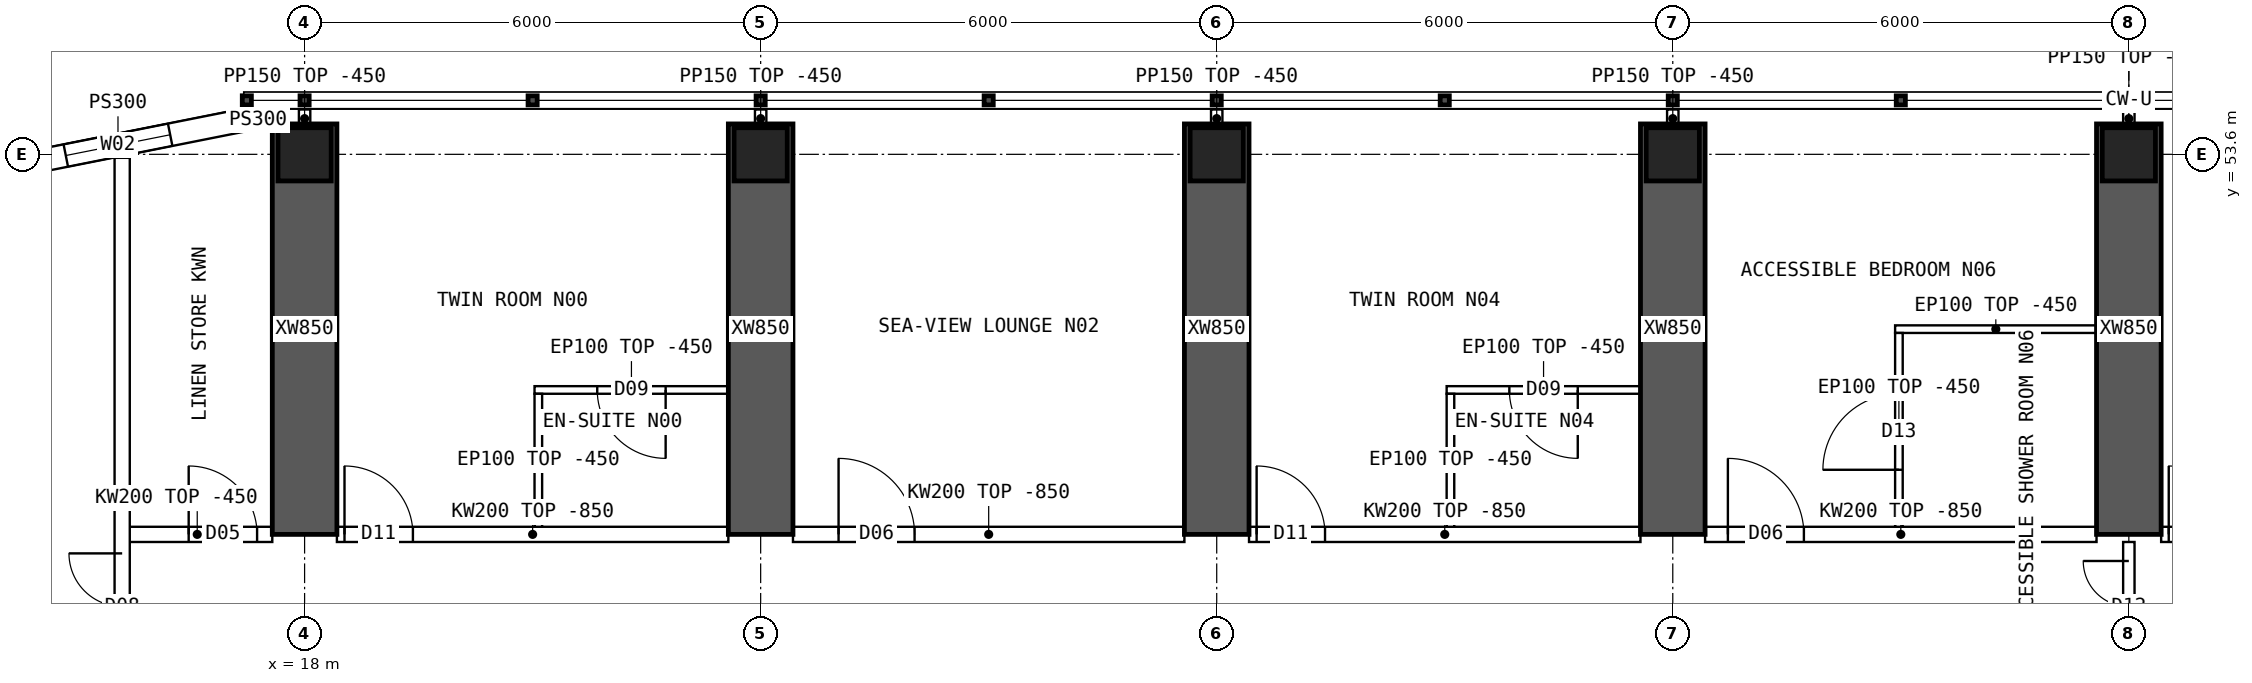
"""IFC4 building model, lengths in metres.
Left out: names, types, materials, properties, quantities, classifications, styles, units other than length and angle.
Written with IfcOpenShell. Run it as: python <this file> out.ifc"""

import sys

from ifc_helpers import new_model, si_unit, direction, frame, frame_2d, origin, origin_2d, place, context, subcontext, project, spatial, polyline, rectangle, hollow_rectangle, outline, extrude, element, fill, save


model = new_model("IFC4")
c1 = context("Model", 3, precision=1e-05, world=origin(), true_north=direction((0.0, 1.0)))
c2 = subcontext(c1, "Body", "Model", "MODEL_VIEW")
j1 = project(units=[si_unit("LENGTHUNIT", "METRE"), si_unit("PLANEANGLEUNIT", "RADIAN")], contexts=[c1])
p1 = place(None, origin())
s1 = spatial("IfcSite", under=j1, at=p1, CompositionType="ELEMENT")
p2 = place(p1, origin())
s2 = spatial("IfcBuilding", under=s1, at=p2, CompositionType="ELEMENT")
p3 = place(p2, frame((0.0, 0.0, 189.85)))
s3 = spatial("IfcBuildingStorey", under=s2, at=p3, CompositionType="ELEMENT", Elevation=189.85)
for number, where, z_axis, x_axis in (
    (1, (18.0, 53.6, 0.0), (0.0, 0.0, 1.0), (1.0, 0.0, 0.0)),
    (2, (24.0, 53.6, 0.0), (0.0, 0.0, 1.0), (1.0, 0.0, 0.0)),
    (3, (30.0, 53.6, 0.0), (0.0, 0.0, 1.0), (1.0, 0.0, 0.0)),
    (4, (36.0, 53.6, 0.0), (0.0, 0.0, 1.0), (1.0, 0.0, 0.0)),
    (5, (42.0, 53.6, 0.0), (0.0, 0.0, 1.0), (1.0, 0.0, 0.0)),
):
    element("IfcColumn", number, at=place(p3, frame(where, z_axis=z_axis, x_axis=x_axis)), inside=s3, PredefinedType="COLUMN", context=c2, shape_type="SweptSolid", body=[
        extrude(hollow_rectangle(XDim=0.7, YDim=0.7, WallThickness=0.07, at=origin_2d()), origin(), (0.0, 0.0, 1.0), 3.75),
    ])
for number, where, z_axis, x_axis in (
    (6, (18.0, 48.6, 0.0), (0.0, 0.0, 1.0), (0.0, 1.0, 0.0)),
    (7, (24.0, 48.6, 0.0), (0.0, 0.0, 1.0), (0.0, 1.0, 0.0)),
    (8, (30.0, 48.6, 0.0), (0.0, 0.0, 1.0), (0.0, 1.0, 0.0)),
    (9, (36.0, 48.6, 0.0), (0.0, 0.0, 1.0), (0.0, 1.0, 0.0)),
    (10, (42.0, 48.6, 0.0), (0.0, 0.0, 1.0), (0.0, 1.0, 0.0)),
):
    element("IfcWall", number, at=place(p3, frame(where, z_axis=z_axis, x_axis=x_axis)), inside=s3, PredefinedType="SHEAR", context=c2, shape_type="SweptSolid", body=[
        extrude(rectangle(XDim=5.4, YDim=0.85, at=frame_2d((2.7, 0.0))), origin(), (0.0, 0.0, 1.0), 3.75),
    ])
p4 = place(p3, frame((17.2, 54.05, 0.0), z_axis=(0.0, 0.0, 1.0), x_axis=(-0.98078325777, -0.195100490205, 0.0)))
e11 = element("IfcWall", 11, at=p4, inside=s3, PredefinedType="SOLIDWALL", context=c2, shape_type="SweptSolid", body=[
    extrude(outline(polyline([(-0.03, -0.15), (3.405, -0.15), (3.345, 0.15), (0.03, 0.15), (-0.03, -0.15)])), origin(), (0.0, 0.0, 1.0), 3.3),
])
p5 = place(p4, frame((0.988, 0.0, 0.9)))
e12 = element("IfcOpeningElement", 12, at=p5, cuts=e11, PredefinedType="OPENING", context=c2, shape_type="SweptSolid", body=[
    extrude(rectangle(XDim=1.4, YDim=1.8, at=frame_2d((0.7, 0.9))), frame((0.0, 0.16, 0.0), z_axis=(0.0, -1.0, 0.0), x_axis=(1.0, 0.0, 0.0)), (0.0, 0.0, 1.0), 0.32),
])
p6 = place(p3, frame((17.2, 54.05, 0.0), z_axis=(0.0, 0.0, 1.0), x_axis=(1.0, 0.0, 0.0)))
e13 = element("IfcWall", 13, at=p6, inside=s3, PredefinedType="SOLIDWALL", context=c2, shape_type="SweptSolid", body=[
    extrude(rectangle(XDim=0.375, YDim=0.3, at=frame_2d((0.188, 0.0))), origin(), (0.0, 0.0, 1.0), 3.3),
])
p7 = place(p3, frame((15.6, 48.6, 0.0), z_axis=(0.0, 0.0, 1.0), x_axis=(1.0, 0.0, 0.0)))
e14 = element("IfcWall", 14, at=p7, inside=s3, PredefinedType="SOLIDWALL", context=c2, shape_type="SweptSolid", body=[
    extrude(rectangle(XDim=1.975, YDim=0.2, at=frame_2d((0.987, 0.0))), origin(), (0.0, 0.0, 1.0), 3.3),
])
p8 = place(p7, frame((0.875, 0.0, 0.0)))
e15 = element("IfcOpeningElement", 15, at=p8, cuts=e14, PredefinedType="OPENING", context=c2, shape_type="SweptSolid", body=[
    extrude(rectangle(XDim=0.9, YDim=2.1, at=frame_2d((0.45, 1.05))), frame((0.0, 0.11, 0.0), z_axis=(0.0, -1.0, 0.0), x_axis=(1.0, 0.0, 0.0)), (0.0, 0.0, 1.0), 0.22),
])
p9 = place(p3, frame((18.425, 48.6, 0.0), z_axis=(0.0, 0.0, 1.0), x_axis=(1.0, 0.0, 0.0)))
e16 = element("IfcWall", 16, at=p9, inside=s3, PredefinedType="SOLIDWALL", context=c2, shape_type="SweptSolid", body=[
    extrude(outline(polyline([(0.0, 0.0), (5.15, 0.0), (5.15, 2.9), (0.0, 2.9), (0.0, 0.0)])), frame((0.0, 0.1, 0.0), z_axis=(0.0, -1.0, 0.0), x_axis=(1.0, 0.0, 0.0)), (0.0, 0.0, 1.0), 0.2),
])
p10 = place(p9, frame((0.1, 0.0, 0.0)))
e17 = element("IfcOpeningElement", 17, at=p10, cuts=e16, PredefinedType="OPENING", context=c2, shape_type="SweptSolid", body=[
    extrude(rectangle(XDim=0.9, YDim=2.1, at=frame_2d((0.45, 1.05))), frame((0.0, 0.11, 0.0), z_axis=(0.0, -1.0, 0.0), x_axis=(1.0, 0.0, 0.0)), (0.0, 0.0, 1.0), 0.22),
])
p11 = place(p3, frame((24.425, 48.6, 0.0), z_axis=(0.0, 0.0, 1.0), x_axis=(1.0, 0.0, 0.0)))
e18 = element("IfcWall", 18, at=p11, inside=s3, PredefinedType="SOLIDWALL", context=c2, shape_type="SweptSolid", body=[
    extrude(outline(polyline([(0.0, 0.0), (5.15, 0.0), (5.15, 2.9), (0.0, 2.9), (0.0, 0.0)])), frame((0.0, 0.1, 0.0), z_axis=(0.0, -1.0, 0.0), x_axis=(1.0, 0.0, 0.0)), (0.0, 0.0, 1.0), 0.2),
])
p12 = place(p11, frame((0.6, 0.0, 0.0)))
e19 = element("IfcOpeningElement", 19, at=p12, cuts=e18, PredefinedType="OPENING", context=c2, shape_type="SweptSolid", body=[
    extrude(rectangle(XDim=1.0, YDim=2.1, at=frame_2d((0.5, 1.05))), frame((0.0, 0.11, 0.0), z_axis=(0.0, -1.0, 0.0), x_axis=(1.0, 0.0, 0.0)), (0.0, 0.0, 1.0), 0.22),
])
p13 = place(p3, frame((30.425, 48.6, 0.0), z_axis=(0.0, 0.0, 1.0), x_axis=(1.0, 0.0, 0.0)))
e20 = element("IfcWall", 20, at=p13, inside=s3, PredefinedType="SOLIDWALL", context=c2, shape_type="SweptSolid", body=[
    extrude(outline(polyline([(0.0, 0.0), (5.15, 0.0), (5.15, 2.9), (0.0, 2.9), (0.0, 0.0)])), frame((0.0, 0.1, 0.0), z_axis=(0.0, -1.0, 0.0), x_axis=(1.0, 0.0, 0.0)), (0.0, 0.0, 1.0), 0.2),
])
p14 = place(p13, frame((0.1, 0.0, 0.0)))
e21 = element("IfcOpeningElement", 21, at=p14, cuts=e20, PredefinedType="OPENING", context=c2, shape_type="SweptSolid", body=[
    extrude(rectangle(XDim=0.9, YDim=2.1, at=frame_2d((0.45, 1.05))), frame((0.0, 0.11, 0.0), z_axis=(0.0, -1.0, 0.0), x_axis=(1.0, 0.0, 0.0)), (0.0, 0.0, 1.0), 0.22),
])
p15 = place(p3, frame((36.425, 48.6, 0.0), z_axis=(0.0, 0.0, 1.0), x_axis=(1.0, 0.0, 0.0)))
e22 = element("IfcWall", 22, at=p15, inside=s3, PredefinedType="SOLIDWALL", context=c2, shape_type="SweptSolid", body=[
    extrude(outline(polyline([(0.0, 0.0), (5.15, 0.0), (5.15, 2.9), (0.0, 2.9), (0.0, 0.0)])), frame((0.0, 0.1, 0.0), z_axis=(0.0, -1.0, 0.0), x_axis=(1.0, 0.0, 0.0)), (0.0, 0.0, 1.0), 0.2),
])
p16 = place(p15, frame((0.3, 0.0, 0.0)))
e23 = element("IfcOpeningElement", 23, at=p16, cuts=e22, PredefinedType="OPENING", context=c2, shape_type="SweptSolid", body=[
    extrude(rectangle(XDim=1.0, YDim=2.1, at=frame_2d((0.5, 1.05))), frame((0.0, 0.11, 0.0), z_axis=(0.0, -1.0, 0.0), x_axis=(1.0, 0.0, 0.0)), (0.0, 0.0, 1.0), 0.22),
])
p17 = place(p3, frame((42.425, 48.6, 0.0), z_axis=(0.0, 0.0, 1.0), x_axis=(1.0, 0.0, 0.0)))
e24 = element("IfcWall", 24, at=p17, inside=s3, PredefinedType="SOLIDWALL", context=c2, shape_type="SweptSolid", body=[
    extrude(outline(polyline([(0.0, 0.0), (5.15, 0.0), (5.15, 2.9), (0.0, 2.9), (0.0, 0.0)])), frame((0.0, 0.1, 0.0), z_axis=(0.0, -1.0, 0.0), x_axis=(1.0, 0.0, 0.0)), (0.0, 0.0, 1.0), 0.2),
])
p18 = place(p17, frame((0.1, 0.0, 0.0)))
e25 = element("IfcOpeningElement", 25, at=p18, cuts=e24, PredefinedType="OPENING", context=c2, shape_type="SweptSolid", body=[
    extrude(rectangle(XDim=0.9, YDim=2.1, at=frame_2d((0.45, 1.05))), frame((0.0, 0.11, 0.0), z_axis=(0.0, -1.0, 0.0), x_axis=(1.0, 0.0, 0.0)), (0.0, 0.0, 1.0), 0.22),
])
p19 = place(p3, frame((21.025, 50.5, 0.0), z_axis=(0.0, 0.0, 1.0), x_axis=(1.0, 0.0, 0.0)))
e26 = element("IfcWall", 26, at=p19, inside=s3, PredefinedType="PARTITIONING", context=c2, shape_type="SweptSolid", body=[
    extrude(rectangle(XDim=2.55, YDim=0.1, at=frame_2d((1.275, 0.0))), origin(), (0.0, 0.0, 1.0), 3.3),
])
p20 = place(p19, frame((0.825, 0.0, 0.0)))
e27 = element("IfcOpeningElement", 27, at=p20, cuts=e26, PredefinedType="OPENING", context=c2, shape_type="SweptSolid", body=[
    extrude(rectangle(XDim=0.9, YDim=2.1, at=frame_2d((0.45, 1.05))), frame((0.0, 0.06, 0.0), z_axis=(0.0, -1.0, 0.0), x_axis=(1.0, 0.0, 0.0)), (0.0, 0.0, 1.0), 0.12),
])
p21 = place(p3, frame((21.075, 50.45, 0.0), z_axis=(0.0, 0.0, 1.0), x_axis=(0.0, -1.0, 0.0)))
e28 = element("IfcWall", 28, at=p21, inside=s3, PredefinedType="PARTITIONING", context=c2, shape_type="SweptSolid", body=[
    extrude(outline(polyline([(0.0, 0.0), (1.75, 0.0), (1.75, 2.9), (1.702, 2.9), (1.7, 3.3), (0.0, 3.3), (0.0, 0.0)])), frame((0.0, 0.05, 0.0), z_axis=(0.0, -1.0, 0.0), x_axis=(1.0, 0.0, 0.0)), (0.0, 0.0, 1.0), 0.1),
])
p22 = place(p3, frame((33.025, 50.5, 0.0), z_axis=(0.0, 0.0, 1.0), x_axis=(1.0, 0.0, 0.0)))
e29 = element("IfcWall", 29, at=p22, inside=s3, PredefinedType="PARTITIONING", context=c2, shape_type="SweptSolid", body=[
    extrude(rectangle(XDim=2.55, YDim=0.1, at=frame_2d((1.275, 0.0))), origin(), (0.0, 0.0, 1.0), 3.3),
])
p23 = place(p22, frame((0.825, 0.0, 0.0)))
e30 = element("IfcOpeningElement", 30, at=p23, cuts=e29, PredefinedType="OPENING", context=c2, shape_type="SweptSolid", body=[
    extrude(rectangle(XDim=0.9, YDim=2.1, at=frame_2d((0.45, 1.05))), frame((0.0, 0.06, 0.0), z_axis=(0.0, -1.0, 0.0), x_axis=(1.0, 0.0, 0.0)), (0.0, 0.0, 1.0), 0.12),
])
p24 = place(p3, frame((33.075, 50.45, 0.0), z_axis=(0.0, 0.0, 1.0), x_axis=(0.0, -1.0, 0.0)))
e31 = element("IfcWall", 31, at=p24, inside=s3, PredefinedType="PARTITIONING", context=c2, shape_type="SweptSolid", body=[
    extrude(outline(polyline([(0.0, 0.0), (1.75, 0.0), (1.75, 2.9), (1.702, 2.9), (1.7, 3.3), (0.0, 3.3), (0.0, 0.0)])), frame((0.0, 0.05, 0.0), z_axis=(0.0, -1.0, 0.0), x_axis=(1.0, 0.0, 0.0)), (0.0, 0.0, 1.0), 0.1),
])
p25 = place(p3, frame((38.925, 51.3, 0.0), z_axis=(0.0, 0.0, 1.0), x_axis=(1.0, 0.0, 0.0)))
e32 = element("IfcWall", 32, at=p25, inside=s3, PredefinedType="PARTITIONING", context=c2, shape_type="SweptSolid", body=[
    extrude(rectangle(XDim=2.65, YDim=0.1, at=frame_2d((1.325, 0.0))), origin(), (0.0, 0.0, 1.0), 3.3),
])
p26 = place(p3, frame((38.975, 51.25, 0.0), z_axis=(0.0, 0.0, 1.0), x_axis=(0.0, -1.0, 0.0)))
e33 = element("IfcWall", 33, at=p26, inside=s3, PredefinedType="PARTITIONING", context=c2, shape_type="SweptSolid", body=[
    extrude(outline(polyline([(0.0, 0.0), (2.55, 0.0), (2.55, 2.9), (2.502, 2.9), (2.5, 3.3), (0.0, 3.3), (0.0, 0.0)])), frame((0.0, 0.05, 0.0), z_axis=(0.0, -1.0, 0.0), x_axis=(1.0, 0.0, 0.0)), (0.0, 0.0, 1.0), 0.1),
])
p27 = place(p26, frame((0.8, 0.0, 0.0)))
e34 = element("IfcOpeningElement", 34, at=p27, cuts=e33, PredefinedType="OPENING", context=c2, shape_type="SweptSolid", body=[
    extrude(rectangle(XDim=1.0, YDim=2.1, at=frame_2d((0.5, 1.05))), frame((0.0, 0.06, 0.0), z_axis=(0.0, -1.0, 0.0), x_axis=(1.0, 0.0, 0.0)), (0.0, 0.0, 1.0), 0.12),
])
p28 = place(p3, frame((42.0, 46.8, 0.0), z_axis=(0.0, 0.0, 1.0), x_axis=(0.0, 1.0, 0.0)))
e35 = element("IfcWall", 35, at=p28, inside=s3, PredefinedType="PARTITIONING", context=c2, shape_type="SweptSolid", body=[
    extrude(outline(polyline([(0.0, 0.0), (1.7, 0.0), (1.7, 2.9), (0.0, 2.9), (0.0, 0.0)])), frame((0.0, 0.075, 0.0), z_axis=(0.0, -1.0, 0.0), x_axis=(1.0, 0.0, 0.0)), (0.0, 0.0, 1.0), 0.15),
])
p29 = place(p28, frame((0.25, 0.0, 0.0)))
e36 = element("IfcOpeningElement", 36, at=p29, cuts=e35, PredefinedType="OPENING", context=c2, shape_type="SweptSolid", body=[
    extrude(rectangle(XDim=1.2, YDim=2.1, at=frame_2d((0.6, 1.05))), frame((0.0, 0.085, 0.0), z_axis=(0.0, -1.0, 0.0), x_axis=(1.0, 0.0, 0.0)), (0.0, 0.0, 1.0), 0.17),
])
p30 = place(p3, frame((15.6, 10.446, 0.0), z_axis=(0.0, 0.0, 1.0), x_axis=(0.0, 1.0, 0.0)))
e37 = element("IfcWall", 37, at=p30, inside=s3, PredefinedType="SOLIDWALL", context=c2, shape_type="SweptSolid", body=[
    extrude(rectangle(XDim=43.107, YDim=0.2, at=frame_2d((21.554, 0.0))), origin(), (0.0, 0.0, 1.0), 3.3),
])
p31 = place(p30, frame((5.104, 0.0, 0.0)))
e38 = element("IfcOpeningElement", 38, at=p31, cuts=e37, PredefinedType="OPENING", context=c2, shape_type="SweptSolid", body=[
    extrude(rectangle(XDim=1.4, YDim=2.1, at=frame_2d((0.7, 1.05))), frame((0.0, 0.11, 0.0), z_axis=(0.0, -1.0, 0.0), x_axis=(1.0, 0.0, 0.0)), (0.0, 0.0, 1.0), 0.22),
])
p32 = place(p30, frame((36.504, 0.0, 0.0)))
e39 = element("IfcOpeningElement", 39, at=p32, cuts=e37, PredefinedType="OPENING", context=c2, shape_type="SweptSolid", body=[
    extrude(rectangle(XDim=1.4, YDim=2.1, at=frame_2d((0.7, 1.05))), frame((0.0, 0.11, 0.0), z_axis=(0.0, -1.0, 0.0), x_axis=(1.0, 0.0, 0.0)), (0.0, 0.0, 1.0), 0.22),
])
for number, where, z_axis, x_axis in (
    (40, (18.0, 53.95, 0.0), (0.0, 0.0, 1.0), (0.0, 1.0, 0.0)),
    (41, (24.0, 53.95, 0.0), (0.0, 0.0, 1.0), (0.0, 1.0, 0.0)),
    (42, (30.0, 53.95, 0.0), (0.0, 0.0, 1.0), (0.0, 1.0, 0.0)),
    (43, (36.0, 53.95, 0.0), (0.0, 0.0, 1.0), (0.0, 1.0, 0.0)),
    (44, (42.0, 53.95, 0.0), (0.0, 0.0, 1.0), (0.0, 1.0, 0.0)),
):
    element("IfcWall", number, at=place(p3, frame(where, z_axis=z_axis, x_axis=x_axis)), inside=s3, PredefinedType="PARTITIONING", context=c2, shape_type="SweptSolid", body=[
        extrude(rectangle(XDim=0.24, YDim=0.15, at=frame_2d((0.12, 0.0))), origin(), (0.0, 0.0, 1.0), 3.3),
    ])
p33 = place(p5, origin())
e45 = element("IfcWindow", 45, at=p33, inside=s3, PartitioningType="SINGLE_PANEL", PredefinedType="WINDOW", context=c2, shape_type="SweptSolid", body=[
    extrude(rectangle(XDim=1.4, YDim=1.8, at=frame_2d((0.7, 0.9))), frame((0.0, 0.03, 0.0), z_axis=(0.0, -1.0, 0.0), x_axis=(1.0, 0.0, 0.0)), (0.0, 0.0, 1.0), 0.06),
])
fill(e12, e45)
p34 = place(p20, origin())
e46 = element("IfcDoor", 46, at=p34, inside=s3, OperationType="SINGLE_SWING_RIGHT", PredefinedType="DOOR", context=c2, shape_type="SweptSolid", body=[
    extrude(rectangle(XDim=0.9, YDim=2.1, at=frame_2d((0.45, 1.05))), frame((0.0, 0.025, 0.0), z_axis=(0.0, -1.0, 0.0), x_axis=(1.0, 0.0, 0.0)), (0.0, 0.0, 1.0), 0.05),
])
fill(e27, e46)
p35 = place(p10, origin())
e47 = element("IfcDoor", 47, at=p35, inside=s3, OperationType="SINGLE_SWING_LEFT", PredefinedType="DOOR", context=c2, shape_type="SweptSolid", body=[
    extrude(rectangle(XDim=0.9, YDim=2.1, at=frame_2d((0.45, 1.05))), frame((0.0, 0.025, 0.0), z_axis=(0.0, -1.0, 0.0), x_axis=(1.0, 0.0, 0.0)), (0.0, 0.0, 1.0), 0.05),
])
fill(e17, e47)
p36 = place(p12, origin())
e48 = element("IfcDoor", 48, at=p36, inside=s3, OperationType="SINGLE_SWING_LEFT", PredefinedType="DOOR", context=c2, shape_type="SweptSolid", body=[
    extrude(rectangle(XDim=1.0, YDim=2.1, at=frame_2d((0.5, 1.05))), frame((0.0, 0.025, 0.0), z_axis=(0.0, -1.0, 0.0), x_axis=(1.0, 0.0, 0.0)), (0.0, 0.0, 1.0), 0.05),
])
fill(e19, e48)
p37 = place(p23, origin())
e49 = element("IfcDoor", 49, at=p37, inside=s3, OperationType="SINGLE_SWING_RIGHT", PredefinedType="DOOR", context=c2, shape_type="SweptSolid", body=[
    extrude(rectangle(XDim=0.9, YDim=2.1, at=frame_2d((0.45, 1.05))), frame((0.0, 0.025, 0.0), z_axis=(0.0, -1.0, 0.0), x_axis=(1.0, 0.0, 0.0)), (0.0, 0.0, 1.0), 0.05),
])
fill(e30, e49)
p38 = place(p14, origin())
e50 = element("IfcDoor", 50, at=p38, inside=s3, OperationType="SINGLE_SWING_LEFT", PredefinedType="DOOR", context=c2, shape_type="SweptSolid", body=[
    extrude(rectangle(XDim=0.9, YDim=2.1, at=frame_2d((0.45, 1.05))), frame((0.0, 0.025, 0.0), z_axis=(0.0, -1.0, 0.0), x_axis=(1.0, 0.0, 0.0)), (0.0, 0.0, 1.0), 0.05),
])
fill(e21, e50)
p39 = place(p27, origin())
e51 = element("IfcDoor", 51, at=p39, inside=s3, OperationType="SINGLE_SWING_RIGHT", PredefinedType="DOOR", context=c2, shape_type="SweptSolid", body=[
    extrude(rectangle(XDim=1.0, YDim=2.1, at=frame_2d((0.5, 1.05))), frame((0.0, 0.025, 0.0), z_axis=(0.0, -1.0, 0.0), x_axis=(1.0, 0.0, 0.0)), (0.0, 0.0, 1.0), 0.05),
])
fill(e34, e51)
p40 = place(p16, origin())
e52 = element("IfcDoor", 52, at=p40, inside=s3, OperationType="SINGLE_SWING_LEFT", PredefinedType="DOOR", context=c2, shape_type="SweptSolid", body=[
    extrude(rectangle(XDim=1.0, YDim=2.1, at=frame_2d((0.5, 1.05))), frame((0.0, 0.025, 0.0), z_axis=(0.0, -1.0, 0.0), x_axis=(1.0, 0.0, 0.0)), (0.0, 0.0, 1.0), 0.05),
])
fill(e23, e52)
p41 = place(p18, origin())
e53 = element("IfcDoor", 53, at=p41, inside=s3, OperationType="SINGLE_SWING_LEFT", PredefinedType="DOOR", context=c2, shape_type="SweptSolid", body=[
    extrude(rectangle(XDim=0.9, YDim=2.1, at=frame_2d((0.45, 1.05))), frame((0.0, 0.025, 0.0), z_axis=(0.0, -1.0, 0.0), x_axis=(1.0, 0.0, 0.0)), (0.0, 0.0, 1.0), 0.05),
])
fill(e25, e53)
p42 = place(p29, origin())
e54 = element("IfcDoor", 54, at=p42, inside=s3, OperationType="DOUBLE_DOOR_SINGLE_SWING", PredefinedType="DOOR", context=c2, shape_type="SweptSolid", body=[
    extrude(rectangle(XDim=1.2, YDim=2.1, at=frame_2d((0.6, 1.05))), frame((0.0, 0.025, 0.0), z_axis=(0.0, -1.0, 0.0), x_axis=(1.0, 0.0, 0.0)), (0.0, 0.0, 1.0), 0.05),
])
fill(e36, e54)
p43 = place(p32, origin())
e55 = element("IfcDoor", 55, at=p43, inside=s3, OperationType="DOUBLE_DOOR_SINGLE_SWING", PredefinedType="DOOR", context=c2, shape_type="SweptSolid", body=[
    extrude(rectangle(XDim=1.4, YDim=2.1, at=frame_2d((0.7, 1.05))), frame((0.0, 0.025, 0.0), z_axis=(0.0, -1.0, 0.0), x_axis=(1.0, 0.0, 0.0)), (0.0, 0.0, 1.0), 0.05),
])
fill(e39, e55)
p44 = place(p8, origin())
e56 = element("IfcDoor", 56, at=p44, inside=s3, OperationType="SINGLE_SWING_LEFT", PredefinedType="DOOR", context=c2, shape_type="SweptSolid", body=[
    extrude(rectangle(XDim=0.9, YDim=2.1, at=frame_2d((0.45, 1.05))), frame((0.0, 0.025, 0.0), z_axis=(0.0, -1.0, 0.0), x_axis=(1.0, 0.0, 0.0)), (0.0, 0.0, 1.0), 0.05),
])
fill(e15, e56)
save(model, sys.argv[1])
